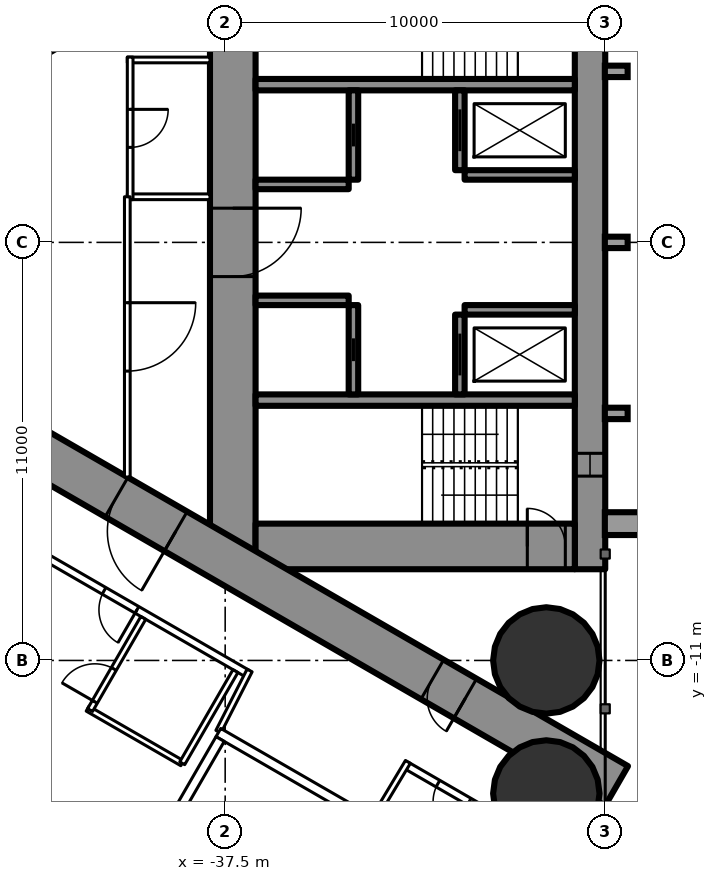
"""IFC4 building model, lengths in metres.
Left out: names, types, materials, properties, quantities, classifications, styles, units other than length and angle.
Written with IfcOpenShell. Run it as: python <this file> out.ifc"""

import sys

from ifc_helpers import new_model, si_unit, direction, frame, frame_2d, origin, origin_2d, place, context, subcontext, project, spatial, rectangle, hollow_circle, extrude, element, fill, save


model = new_model("IFC4")
c1 = context("Model", 3, precision=1e-05, world=origin(), true_north=direction((0.0, 1.0)))
c2 = subcontext(c1, "Body", "Model", "MODEL_VIEW")
j1 = project(units=[si_unit("LENGTHUNIT", "METRE"), si_unit("PLANEANGLEUNIT", "RADIAN")], contexts=[c1])
p1 = place(None, origin())
s1 = spatial("IfcSite", under=j1, at=p1, CompositionType="ELEMENT")
p2 = place(p1, origin())
s2 = spatial("IfcBuilding", under=s1, at=p2, CompositionType="ELEMENT")
p3 = place(p2, frame((0.0, 0.0, 39.0)))
s3 = spatial("IfcBuildingStorey", under=s2, at=p3, CompositionType="ELEMENT", Elevation=39.0)
for number, where, z_axis, x_axis in (
    (1, (-29.05, -11.0, 0.0), (0.0, 0.0, 1.0), (1.0, 0.0, 0.0)),
    (2, (-29.05, -14.5, 0.0), (0.0, 0.0, 1.0), (1.0, 0.0, 0.0)),
):
    element("IfcColumn", number, at=place(p3, frame(where, z_axis=z_axis, x_axis=x_axis)), inside=s3, PredefinedType="COLUMN", context=c2, shape_type="SweptSolid", body=[
        extrude(hollow_circle(Radius=1.4, WallThickness=0.12, at=origin_2d()), origin(), (0.0, 0.0, 1.0), 3.5),
    ])
p4 = place(p3, frame((-27.9, 8.6, 0.0), z_axis=(0.0, 0.0, 1.0), x_axis=(0.0, -1.0, 0.0)))
e3 = element("IfcWall", 3, at=p4, inside=s3, PredefinedType="SHEAR", context=c2, shape_type="SweptSolid", body=[
    extrude(rectangle(XDim=17.2, YDim=0.8, at=frame_2d((8.6, 0.0))), origin(), (0.0, 0.0, 1.0), 3.5),
])
p5 = place(p4, frame((2.45, 0.0, 0.6)))
e4 = element("IfcOpeningElement", 4, at=p5, cuts=e3, PredefinedType="OPENING", context=c2, shape_type="SweptSolid", body=[
    extrude(rectangle(XDim=0.6, YDim=2.1, at=frame_2d((0.3, 1.05))), frame((0.0, 0.41, 0.0), z_axis=(0.0, -1.0, 0.0), x_axis=(1.0, 0.0, 0.0)), (0.0, 0.0, 1.0), 0.82),
])
p6 = place(p4, frame((14.15, 0.0, 0.6)))
e5 = element("IfcOpeningElement", 5, at=p6, cuts=e3, PredefinedType="OPENING", context=c2, shape_type="SweptSolid", body=[
    extrude(rectangle(XDim=0.6, YDim=2.1, at=frame_2d((0.3, 1.05))), frame((0.0, 0.41, 0.0), z_axis=(0.0, -1.0, 0.0), x_axis=(1.0, 0.0, 0.0)), (0.0, 0.0, 1.0), 0.82),
])
p7 = place(p3, frame((-37.3, 8.6, 0.0), z_axis=(0.0, 0.0, 1.0), x_axis=(0.0, -1.0, 0.0)))
e6 = element("IfcWall", 6, at=p7, inside=s3, PredefinedType="SHEAR", context=c2, shape_type="SweptSolid", body=[
    extrude(rectangle(XDim=17.2, YDim=1.2, at=frame_2d((8.6, 0.0))), origin(), (0.0, 0.0, 1.0), 3.5),
])
p8 = place(p7, frame((7.7, 0.0, 0.0)))
e7 = element("IfcOpeningElement", 7, at=p8, cuts=e6, PredefinedType="OPENING", context=c2, shape_type="SweptSolid", body=[
    extrude(rectangle(XDim=1.8, YDim=2.2, at=frame_2d((0.9, 1.1))), frame((0.0, 0.61, 0.0), z_axis=(0.0, -1.0, 0.0), x_axis=(1.0, 0.0, 0.0)), (0.0, 0.0, 1.0), 1.22),
])
p9 = place(p3, frame((-28.3, -8.0, 0.0), z_axis=(0.0, 0.0, 1.0), x_axis=(-1.0, 0.0, 0.0)))
e8 = element("IfcWall", 8, at=p9, inside=s3, PredefinedType="SHEAR", context=c2, shape_type="SweptSolid", body=[
    extrude(rectangle(XDim=8.4, YDim=1.2, at=frame_2d((4.2, 0.0))), origin(), (0.0, 0.0, 1.0), 3.5),
])
p10 = place(p9, frame((0.25, 0.0, 0.0)))
e9 = element("IfcOpeningElement", 9, at=p10, cuts=e8, PredefinedType="OPENING", context=c2, shape_type="SweptSolid", body=[
    extrude(rectangle(XDim=1.0, YDim=2.2, at=frame_2d((0.5, 1.1))), frame((0.0, 0.61, 0.0), z_axis=(0.0, -1.0, 0.0), x_axis=(1.0, 0.0, 0.0)), (0.0, 0.0, 1.0), 1.22),
])
for number, where, z_axis, x_axis in (
    (10, (-28.3, 4.15, 0.0), (0.0, 0.0, 1.0), (-1.0, 0.0, 0.0)),
    (11, (-28.3, -4.15, 0.0), (0.0, 0.0, 1.0), (-1.0, 0.0, 0.0)),
):
    element("IfcWall", number, at=place(p3, frame(where, z_axis=z_axis, x_axis=x_axis)), inside=s3, PredefinedType="SHEAR", context=c2, shape_type="SweptSolid", body=[
        extrude(rectangle(XDim=8.4, YDim=0.3, at=frame_2d((4.2, 0.0))), origin(), (0.0, 0.0, 1.0), 3.5),
    ])
p11 = place(p3, frame((-31.325, 4.0, 0.0), z_axis=(0.0, 0.0, 1.0), x_axis=(0.0, -1.0, 0.0)))
e12 = element("IfcWall", 12, at=p11, inside=s3, PredefinedType="SHEAR", context=c2, shape_type="SweptSolid", body=[
    extrude(rectangle(XDim=2.1, YDim=0.25, at=frame_2d((1.05, 0.0))), origin(), (0.0, 0.0, 1.0), 3.5),
])
p12 = place(p11, frame((0.5, 0.0, 0.0)))
e13 = element("IfcOpeningElement", 13, at=p12, cuts=e12, PredefinedType="OPENING", context=c2, shape_type="SweptSolid", body=[
    extrude(rectangle(XDim=1.1, YDim=2.2, at=frame_2d((0.55, 1.1))), frame((0.0, 0.135, 0.0), z_axis=(0.0, -1.0, 0.0), x_axis=(1.0, 0.0, 0.0)), (0.0, 0.0, 1.0), 0.27),
])
p13 = place(p3, frame((-34.125, 4.0, 0.0), z_axis=(0.0, 0.0, 1.0), x_axis=(0.0, -1.0, 0.0)))
e14 = element("IfcWall", 14, at=p13, inside=s3, PredefinedType="SHEAR", context=c2, shape_type="SweptSolid", body=[
    extrude(rectangle(XDim=2.35, YDim=0.25, at=frame_2d((1.175, 0.0))), origin(), (0.0, 0.0, 1.0), 3.5),
])
p14 = place(p13, frame((0.875, 0.0, 0.0)))
e15 = element("IfcOpeningElement", 15, at=p14, cuts=e14, PredefinedType="OPENING", context=c2, shape_type="SweptSolid", body=[
    extrude(rectangle(XDim=0.6, YDim=2.0, at=frame_2d((0.3, 1.0))), frame((0.0, 0.135, 0.0), z_axis=(0.0, -1.0, 0.0), x_axis=(1.0, 0.0, 0.0)), (0.0, 0.0, 1.0), 0.27),
])
p15 = place(p3, frame((-28.3, 1.775, 0.0), z_axis=(0.0, 0.0, 1.0), x_axis=(-1.0, 0.0, 0.0)))
e16 = element("IfcWall", 16, at=p15, inside=s3, PredefinedType="SHEAR", context=c2, shape_type="SweptSolid", body=[
    extrude(rectangle(XDim=2.9, YDim=0.25, at=frame_2d((1.45, 0.0))), origin(), (0.0, 0.0, 1.0), 3.5),
])
p16 = place(p3, frame((-34.25, 1.525, 0.0), z_axis=(0.0, 0.0, 1.0), x_axis=(-1.0, 0.0, 0.0)))
e17 = element("IfcWall", 17, at=p16, inside=s3, PredefinedType="SHEAR", context=c2, shape_type="SweptSolid", body=[
    extrude(rectangle(XDim=2.45, YDim=0.25, at=frame_2d((1.225, 0.0))), origin(), (0.0, 0.0, 1.0), 3.5),
])
p17 = place(p3, frame((-31.325, -1.9, 0.0), z_axis=(0.0, 0.0, 1.0), x_axis=(0.0, -1.0, 0.0)))
e18 = element("IfcWall", 18, at=p17, inside=s3, PredefinedType="SHEAR", context=c2, shape_type="SweptSolid", body=[
    extrude(rectangle(XDim=2.1, YDim=0.25, at=frame_2d((1.05, 0.0))), origin(), (0.0, 0.0, 1.0), 3.5),
])
p18 = place(p17, frame((0.5, 0.0, 0.0)))
e19 = element("IfcOpeningElement", 19, at=p18, cuts=e18, PredefinedType="OPENING", context=c2, shape_type="SweptSolid", body=[
    extrude(rectangle(XDim=1.1, YDim=2.2, at=frame_2d((0.55, 1.1))), frame((0.0, 0.135, 0.0), z_axis=(0.0, -1.0, 0.0), x_axis=(1.0, 0.0, 0.0)), (0.0, 0.0, 1.0), 0.27),
])
p19 = place(p3, frame((-34.125, -1.65, 0.0), z_axis=(0.0, 0.0, 1.0), x_axis=(0.0, -1.0, 0.0)))
e20 = element("IfcWall", 20, at=p19, inside=s3, PredefinedType="SHEAR", context=c2, shape_type="SweptSolid", body=[
    extrude(rectangle(XDim=2.35, YDim=0.25, at=frame_2d((1.175, 0.0))), origin(), (0.0, 0.0, 1.0), 3.5),
])
p20 = place(p19, frame((0.875, 0.0, 0.0)))
e21 = element("IfcOpeningElement", 21, at=p20, cuts=e20, PredefinedType="OPENING", context=c2, shape_type="SweptSolid", body=[
    extrude(rectangle(XDim=0.6, YDim=2.0, at=frame_2d((0.3, 1.0))), frame((0.0, 0.135, 0.0), z_axis=(0.0, -1.0, 0.0), x_axis=(1.0, 0.0, 0.0)), (0.0, 0.0, 1.0), 0.27),
])
p21 = place(p3, frame((-28.3, -1.775, 0.0), z_axis=(0.0, 0.0, 1.0), x_axis=(-1.0, 0.0, 0.0)))
e22 = element("IfcWall", 22, at=p21, inside=s3, PredefinedType="SHEAR", context=c2, shape_type="SweptSolid", body=[
    extrude(rectangle(XDim=2.9, YDim=0.25, at=frame_2d((1.45, 0.0))), origin(), (0.0, 0.0, 1.0), 3.5),
])
p22 = place(p3, frame((-34.25, -1.525, 0.0), z_axis=(0.0, 0.0, 1.0), x_axis=(-1.0, 0.0, 0.0)))
e23 = element("IfcWall", 23, at=p22, inside=s3, PredefinedType="SHEAR", context=c2, shape_type="SweptSolid", body=[
    extrude(rectangle(XDim=2.45, YDim=0.25, at=frame_2d((1.225, 0.0))), origin(), (0.0, 0.0, 1.0), 3.5),
])
p23 = place(p3, frame((-27.2, 14.3, 0.0), z_axis=(0.0, 0.0, 1.0), x_axis=(-0.866026593062, -0.499997940104, 0.0)))
e24 = element("IfcWall", 24, at=p23, inside=s3, PredefinedType="SHEAR", context=c2, shape_type="SweptSolid", body=[
    extrude(rectangle(XDim=28.946, YDim=1.2, at=frame_2d((14.473, 0.0))), origin(), (0.0, 0.0, 1.0), 3.5),
])
p24 = place(p23, frame((4.6, 0.0, 0.0)))
e25 = element("IfcOpeningElement", 25, at=p24, cuts=e24, PredefinedType="OPENING", context=c2, shape_type="SweptSolid", body=[
    extrude(rectangle(XDim=1.0, YDim=2.2, at=frame_2d((0.5, 1.1))), frame((0.0, 0.61, 0.0), z_axis=(0.0, -1.0, 0.0), x_axis=(1.0, 0.0, 0.0)), (0.0, 0.0, 1.0), 1.22),
])
p25 = place(p23, frame((13.395, 0.0, 0.0)))
e26 = element("IfcOpeningElement", 26, at=p25, cuts=e24, PredefinedType="OPENING", context=c2, shape_type="SweptSolid", body=[
    extrude(rectangle(XDim=1.8, YDim=2.2, at=frame_2d((0.9, 1.1))), frame((0.0, 0.61, 0.0), z_axis=(0.0, -1.0, 0.0), x_axis=(1.0, 0.0, 0.0)), (0.0, 0.0, 1.0), 1.22),
])
p26 = place(p3, frame((-27.2, -14.3, 0.0), z_axis=(0.0, 0.0, 1.0), x_axis=(-0.866024021859, 0.500002393557, 0.0)))
e27 = element("IfcWall", 27, at=p26, inside=s3, PredefinedType="SHEAR", context=c2, shape_type="SweptSolid", body=[
    extrude(rectangle(XDim=27.907, YDim=1.2, at=frame_2d((13.954, 0.0))), origin(), (0.0, 0.0, 1.0), 3.5),
])
p27 = place(p26, frame((4.6, 0.0, 0.0)))
e28 = element("IfcOpeningElement", 28, at=p27, cuts=e27, PredefinedType="OPENING", context=c2, shape_type="SweptSolid", body=[
    extrude(rectangle(XDim=1.0, YDim=2.2, at=frame_2d((0.5, 1.1))), frame((0.0, 0.61, 0.0), z_axis=(0.0, -1.0, 0.0), x_axis=(1.0, 0.0, 0.0)), (0.0, 0.0, 1.0), 1.22),
])
p28 = place(p26, frame((13.395, 0.0, 0.0)))
e29 = element("IfcOpeningElement", 29, at=p28, cuts=e27, PredefinedType="OPENING", context=c2, shape_type="SweptSolid", body=[
    extrude(rectangle(XDim=1.8, YDim=2.2, at=frame_2d((0.9, 1.1))), frame((0.0, 0.61, 0.0), z_axis=(0.0, -1.0, 0.0), x_axis=(1.0, 0.0, 0.0)), (0.0, 0.0, 1.0), 1.22),
])
p29 = place(p3, frame((-37.7, 10.894, 0.0), z_axis=(0.0, 0.0, 1.0), x_axis=(-0.866027905338, -0.499995667157, 0.0)))
e30 = element("IfcWall", 30, at=p29, inside=s3, PredefinedType="PARTITIONING", context=c2, shape_type="SweptSolid", body=[
    extrude(rectangle(XDim=21.787, YDim=0.2, at=frame_2d((10.894, 0.0))), origin(), (0.0, 0.0, 1.0), 3.25),
])
p30 = place(p29, frame((11.78, 0.0, 0.0)))
e31 = element("IfcOpeningElement", 31, at=p30, cuts=e30, PredefinedType="OPENING", context=c2, shape_type="SweptSolid", body=[
    extrude(rectangle(XDim=0.95, YDim=2.2, at=frame_2d((0.475, 1.1))), frame((0.0, 0.11, 0.0), z_axis=(0.0, -1.0, 0.0), x_axis=(1.0, 0.0, 0.0)), (0.0, 0.0, 1.0), 0.22),
])
p31 = place(p29, frame((2.95, 0.0, 0.0)))
e32 = element("IfcOpeningElement", 32, at=p31, cuts=e30, PredefinedType="OPENING", context=c2, shape_type="SweptSolid", body=[
    extrude(rectangle(XDim=0.95, YDim=2.2, at=frame_2d((0.475, 1.1))), frame((0.0, 0.11, 0.0), z_axis=(0.0, -1.0, 0.0), x_axis=(1.0, 0.0, 0.0)), (0.0, 0.0, 1.0), 0.22),
])
p32 = place(p3, frame((-27.572, -16.741, 0.0), z_axis=(0.0, 0.0, 1.0), x_axis=(-0.866024464444, 0.500001626982, 0.0)))
e33 = element("IfcWall", 33, at=p32, inside=s3, PredefinedType="PARTITIONING", context=c2, shape_type="SweptSolid", body=[
    extrude(rectangle(XDim=5.955, YDim=0.2, at=frame_2d((2.978, 0.0))), origin(), (0.0, 0.0, 1.0), 3.25),
])
p33 = place(p32, frame((4.05, 0.0, 0.0)))
e34 = element("IfcOpeningElement", 34, at=p33, cuts=e33, PredefinedType="OPENING", context=c2, shape_type="SweptSolid", body=[
    extrude(rectangle(XDim=0.95, YDim=2.2, at=frame_2d((0.475, 1.1))), frame((0.0, 0.11, 0.0), z_axis=(0.0, -1.0, 0.0), x_axis=(1.0, 0.0, 0.0)), (0.0, 0.0, 1.0), 0.22),
])
p34 = place(p3, frame((-36.92, -11.344, 0.0), z_axis=(0.0, 0.0, 1.0), x_axis=(-0.866028313256, 0.499994960614, 0.0)))
e35 = element("IfcWall", 35, at=p34, inside=s3, PredefinedType="PARTITIONING", context=c2, shape_type="SweptSolid", body=[
    extrude(rectangle(XDim=22.568, YDim=0.2, at=frame_2d((11.284, 0.0))), origin(), (0.0, 0.0, 1.0), 3.25),
])
p35 = place(p34, frame((21.018, 0.0, 0.0)))
e36 = element("IfcOpeningElement", 36, at=p35, cuts=e35, PredefinedType="OPENING", context=c2, shape_type="SweptSolid", body=[
    extrude(rectangle(XDim=0.95, YDim=2.2, at=frame_2d((0.475, 1.1))), frame((0.0, 0.11, 0.0), z_axis=(0.0, -1.0, 0.0), x_axis=(1.0, 0.0, 0.0)), (0.0, 0.0, 1.0), 0.22),
])
p36 = place(p34, frame((3.35, 0.0, 0.0)))
e37 = element("IfcOpeningElement", 37, at=p36, cuts=e35, PredefinedType="OPENING", context=c2, shape_type="SweptSolid", body=[
    extrude(rectangle(XDim=1.0, YDim=2.2, at=frame_2d((0.5, 1.1))), frame((0.0, 0.11, 0.0), z_axis=(0.0, -1.0, 0.0), x_axis=(1.0, 0.0, 0.0)), (0.0, 0.0, 1.0), 0.22),
])
p37 = place(p3, frame((-36.857, -11.265, 0.0), z_axis=(0.0, 0.0, 1.0), x_axis=(-0.454225294761, -0.890886851176, 0.0)))
e38 = element("IfcWall", 38, at=p37, inside=s3, PredefinedType="PARTITIONING", context=c2, shape_type="SweptSolid", body=[
    extrude(rectangle(XDim=1.807, YDim=0.15, at=frame_2d((0.904, 0.0))), origin(), (0.0, 0.0, 1.0), 3.25),
])
p38 = place(p3, frame((-33.621, -15.218, 0.0), z_axis=(0.0, 0.0, 1.0), x_axis=(0.514336634837, 0.857588377991, 0.0)))
e39 = element("IfcWall", 39, at=p38, inside=s3, PredefinedType="PARTITIONING", context=c2, shape_type="SweptSolid", body=[
    extrude(rectangle(XDim=1.805, YDim=0.15, at=frame_2d((0.903, 0.0))), origin(), (0.0, 0.0, 1.0), 3.25),
])
p39 = place(p3, frame((-38.63, -13.705, 0.0), z_axis=(0.0, 0.0, 1.0), x_axis=(-0.866018712932, 0.500011588718, 0.0)))
e40 = element("IfcWall", 40, at=p39, inside=s3, PredefinedType="PARTITIONING", context=c2, shape_type="SweptSolid", body=[
    extrude(rectangle(XDim=2.875, YDim=0.15, at=frame_2d((1.438, 0.0))), origin(), (0.0, 0.0, 1.0), 3.25),
])
p40 = place(p3, frame((-39.655, -9.88, 0.0), z_axis=(0.0, 0.0, 1.0), x_axis=(-0.500049511043, -0.865996816683, 0.0)))
e41 = element("IfcWall", 41, at=p40, inside=s3, PredefinedType="PARTITIONING", context=c2, shape_type="SweptSolid", body=[
    extrude(rectangle(XDim=2.8, YDim=0.15, at=frame_2d((1.4, 0.0))), origin(), (0.0, 0.0, 1.0), 3.25),
])
p41 = place(p40, frame((1.55, 0.0, 0.0)))
e42 = element("IfcOpeningElement", 42, at=p41, cuts=e41, PredefinedType="OPENING", context=c2, shape_type="SweptSolid", body=[
    extrude(rectangle(XDim=1.0, YDim=2.2, at=frame_2d((0.5, 1.1))), frame((0.0, 0.085, 0.0), z_axis=(0.0, -1.0, 0.0), x_axis=(1.0, 0.0, 0.0)), (0.0, 0.0, 1.0), 0.17),
])
p42 = place(p3, frame((-37.23, -11.281, 0.0), z_axis=(0.0, 0.0, 1.0), x_axis=(-0.500049511043, -0.865996816683, 0.0)))
e43 = element("IfcWall", 43, at=p42, inside=s3, PredefinedType="PARTITIONING", context=c2, shape_type="SweptSolid", body=[
    extrude(rectangle(XDim=2.8, YDim=0.15, at=frame_2d((1.4, 0.0))), origin(), (0.0, 0.0, 1.0), 3.25),
])
for number, where, z_axis, x_axis in (
    (44, (-37.9, 1.2, 0.0), (0.0, 0.0, 1.0), (-1.0, 0.0, 0.0)),
    (45, (-37.9, 4.8, 0.0), (0.0, 0.0, 1.0), (-1.0, 0.0, 0.0)),
):
    element("IfcWall", number, at=place(p3, frame(where, z_axis=z_axis, x_axis=x_axis)), inside=s3, PredefinedType="PARTITIONING", context=c2, shape_type="SweptSolid", body=[
        extrude(rectangle(XDim=2.175, YDim=0.15, at=frame_2d((1.087, 0.0))), origin(), (0.0, 0.0, 1.0), 3.25),
    ])
p43 = place(p3, frame((-40.0, 4.875, 0.0), z_axis=(0.0, 0.0, 1.0), x_axis=(0.0, -1.0, 0.0)))
e46 = element("IfcWall", 46, at=p43, inside=s3, PredefinedType="PARTITIONING", context=c2, shape_type="SweptSolid", body=[
    extrude(rectangle(XDim=3.75, YDim=0.15, at=frame_2d((1.875, 0.0))), origin(), (0.0, 0.0, 1.0), 3.25),
])
p44 = place(p43, frame((1.375, 0.0, 0.0)))
e47 = element("IfcOpeningElement", 47, at=p44, cuts=e46, PredefinedType="OPENING", context=c2, shape_type="SweptSolid", body=[
    extrude(rectangle(XDim=1.0, YDim=2.2, at=frame_2d((0.5, 1.1))), frame((0.0, 0.085, 0.0), z_axis=(0.0, -1.0, 0.0), x_axis=(1.0, 0.0, 0.0)), (0.0, 0.0, 1.0), 0.17),
])
p45 = place(p3, frame((-40.075, 1.2, 0.0), z_axis=(0.0, 0.0, 1.0), x_axis=(0.0, -1.0, 0.0)))
e48 = element("IfcWall", 48, at=p45, inside=s3, PredefinedType="PARTITIONING", context=c2, shape_type="SweptSolid", body=[
    extrude(rectangle(XDim=7.374, YDim=0.15, at=frame_2d((3.687, 0.0))), origin(), (0.0, 0.0, 1.0), 3.25),
])
p46 = place(p45, frame((2.787, 0.0, 0.0)))
e49 = element("IfcOpeningElement", 49, at=p46, cuts=e48, PredefinedType="OPENING", context=c2, shape_type="SweptSolid", body=[
    extrude(rectangle(XDim=1.8, YDim=2.2, at=frame_2d((0.9, 1.1))), frame((0.0, 0.085, 0.0), z_axis=(0.0, -1.0, 0.0), x_axis=(1.0, 0.0, 0.0)), (0.0, 0.0, 1.0), 0.17),
])
p47 = place(p3, frame((-33.696, -15.197, 0.0), z_axis=(0.0, 0.0, 1.0), x_axis=(-0.865976953817, 0.500083908417, 0.0)))
e50 = element("IfcWall", 50, at=p47, inside=s3, PredefinedType="PARTITIONING", context=c2, shape_type="SweptSolid", body=[
    extrude(rectangle(XDim=4.599, YDim=0.25, at=frame_2d((2.3, 0.0))), origin(), (0.0, 0.0, 1.0), 3.25),
])
p48 = place(p3, frame((-37.633, -13.068, 0.0), z_axis=(0.0, 0.0, 1.0), x_axis=(-0.499872130319, -0.866099216793, 0.0)))
e51 = element("IfcWall", 51, at=p48, inside=s3, PredefinedType="PARTITIONING", context=c2, shape_type="SweptSolid", body=[
    extrude(rectangle(XDim=3.2, YDim=0.25, at=frame_2d((1.6, 0.0))), origin(), (0.0, 0.0, 1.0), 3.25),
])
p49 = place(p41, origin())
e52 = element("IfcDoor", 52, at=p49, inside=s3, OperationType="SINGLE_SWING_RIGHT", PredefinedType="DOOR", context=c2, shape_type="SweptSolid", body=[
    extrude(rectangle(XDim=1.0, YDim=2.2, at=frame_2d((0.5, 1.1))), frame((0.0, 0.025, 0.0), z_axis=(0.0, -1.0, 0.0), x_axis=(1.0, 0.0, 0.0)), (0.0, 0.0, 1.0), 0.05),
])
fill(e42, e52)
p50 = place(p36, origin())
e53 = element("IfcDoor", 53, at=p50, inside=s3, OperationType="SINGLE_SWING_LEFT", PredefinedType="DOOR", context=c2, shape_type="SweptSolid", body=[
    extrude(rectangle(XDim=1.0, YDim=2.2, at=frame_2d((0.5, 1.1))), frame((0.0, 0.025, 0.0), z_axis=(0.0, -1.0, 0.0), x_axis=(1.0, 0.0, 0.0)), (0.0, 0.0, 1.0), 0.05),
])
fill(e37, e53)
p51 = place(p33, origin())
e54 = element("IfcDoor", 54, at=p51, inside=s3, OperationType="SINGLE_SWING_LEFT", PredefinedType="DOOR", context=c2, shape_type="SweptSolid", body=[
    extrude(rectangle(XDim=0.95, YDim=2.2, at=frame_2d((0.475, 1.1))), frame((0.0, 0.025, 0.0), z_axis=(0.0, -1.0, 0.0), x_axis=(1.0, 0.0, 0.0)), (0.0, 0.0, 1.0), 0.05),
])
fill(e34, e54)
p52 = place(p44, origin())
e55 = element("IfcDoor", 55, at=p52, inside=s3, OperationType="SINGLE_SWING_LEFT", PredefinedType="DOOR", context=c2, shape_type="SweptSolid", body=[
    extrude(rectangle(XDim=1.0, YDim=2.2, at=frame_2d((0.5, 1.1))), frame((0.0, 0.025, 0.0), z_axis=(0.0, -1.0, 0.0), x_axis=(1.0, 0.0, 0.0)), (0.0, 0.0, 1.0), 0.05),
])
fill(e47, e55)
p53 = place(p46, origin())
e56 = element("IfcDoor", 56, at=p53, inside=s3, OperationType="DOUBLE_DOOR_SINGLE_SWING", PredefinedType="DOOR", context=c2, shape_type="SweptSolid", body=[
    extrude(rectangle(XDim=1.8, YDim=2.2, at=frame_2d((0.9, 1.1))), frame((0.0, 0.025, 0.0), z_axis=(0.0, -1.0, 0.0), x_axis=(1.0, 0.0, 0.0)), (0.0, 0.0, 1.0), 0.05),
])
fill(e49, e56)
p54 = place(p27, origin())
e57 = element("IfcDoor", 57, at=p54, inside=s3, OperationType="SINGLE_SWING_LEFT", PredefinedType="DOOR", context=c2, shape_type="SweptSolid", body=[
    extrude(rectangle(XDim=1.0, YDim=2.2, at=frame_2d((0.5, 1.1))), frame((0.0, 0.025, 0.0), z_axis=(0.0, -1.0, 0.0), x_axis=(1.0, 0.0, 0.0)), (0.0, 0.0, 1.0), 0.05),
])
fill(e28, e57)
p55 = place(p28, origin())
e58 = element("IfcDoor", 58, at=p55, inside=s3, OperationType="DOUBLE_DOOR_SINGLE_SWING", PredefinedType="DOOR", context=c2, shape_type="SweptSolid", body=[
    extrude(rectangle(XDim=1.8, YDim=2.2, at=frame_2d((0.9, 1.1))), frame((0.0, 0.025, 0.0), z_axis=(0.0, -1.0, 0.0), x_axis=(1.0, 0.0, 0.0)), (0.0, 0.0, 1.0), 0.05),
])
fill(e29, e58)
p56 = place(p8, origin())
e59 = element("IfcDoor", 59, at=p56, inside=s3, OperationType="DOUBLE_DOOR_SINGLE_SWING", PredefinedType="DOOR", context=c2, shape_type="SweptSolid", body=[
    extrude(rectangle(XDim=1.8, YDim=2.2, at=frame_2d((0.9, 1.1))), frame((0.0, 0.025, 0.0), z_axis=(0.0, -1.0, 0.0), x_axis=(1.0, 0.0, 0.0)), (0.0, 0.0, 1.0), 0.05),
])
fill(e7, e59)
p57 = place(p10, origin())
e60 = element("IfcDoor", 60, at=p57, inside=s3, OperationType="SINGLE_SWING_RIGHT", PredefinedType="DOOR", context=c2, shape_type="SweptSolid", body=[
    extrude(rectangle(XDim=1.0, YDim=2.2, at=frame_2d((0.5, 1.1))), frame((0.0, 0.025, 0.0), z_axis=(0.0, -1.0, 0.0), x_axis=(1.0, 0.0, 0.0)), (0.0, 0.0, 1.0), 0.05),
])
fill(e9, e60)
p58 = place(p12, origin())
e61 = element("IfcDoor", 61, at=p58, inside=s3, OperationType="SLIDING_TO_LEFT", PredefinedType="USERDEFINED", context=c2, shape_type="SweptSolid", body=[
    extrude(rectangle(XDim=1.1, YDim=2.2, at=frame_2d((0.55, 1.1))), frame((0.0, 0.025, 0.0), z_axis=(0.0, -1.0, 0.0), x_axis=(1.0, 0.0, 0.0)), (0.0, 0.0, 1.0), 0.05),
])
fill(e13, e61)
p59 = place(p18, origin())
e62 = element("IfcDoor", 62, at=p59, inside=s3, OperationType="SLIDING_TO_LEFT", PredefinedType="USERDEFINED", context=c2, shape_type="SweptSolid", body=[
    extrude(rectangle(XDim=1.1, YDim=2.2, at=frame_2d((0.55, 1.1))), frame((0.0, 0.025, 0.0), z_axis=(0.0, -1.0, 0.0), x_axis=(1.0, 0.0, 0.0)), (0.0, 0.0, 1.0), 0.05),
])
fill(e19, e62)
p60 = place(p14, origin())
e63 = element("IfcDoor", 63, at=p60, inside=s3, OperationType="SLIDING_TO_LEFT", PredefinedType="DOOR", context=c2, shape_type="SweptSolid", body=[
    extrude(rectangle(XDim=0.6, YDim=2.0, at=frame_2d((0.3, 1.0))), frame((0.0, 0.025, 0.0), z_axis=(0.0, -1.0, 0.0), x_axis=(1.0, 0.0, 0.0)), (0.0, 0.0, 1.0), 0.05),
])
fill(e15, e63)
p61 = place(p20, origin())
e64 = element("IfcDoor", 64, at=p61, inside=s3, OperationType="SLIDING_TO_LEFT", PredefinedType="DOOR", context=c2, shape_type="SweptSolid", body=[
    extrude(rectangle(XDim=0.6, YDim=2.0, at=frame_2d((0.3, 1.0))), frame((0.0, 0.025, 0.0), z_axis=(0.0, -1.0, 0.0), x_axis=(1.0, 0.0, 0.0)), (0.0, 0.0, 1.0), 0.05),
])
fill(e21, e64)
p62 = place(p6, origin())
e65 = element("IfcWindow", 65, at=p62, inside=s3, PartitioningType="SINGLE_PANEL", PredefinedType="WINDOW", context=c2, shape_type="SweptSolid", body=[
    extrude(rectangle(XDim=0.6, YDim=2.1, at=frame_2d((0.3, 1.05))), frame((0.0, 0.03, 0.0), z_axis=(0.0, -1.0, 0.0), x_axis=(1.0, 0.0, 0.0)), (0.0, 0.0, 1.0), 0.06),
])
fill(e5, e65)
save(model, sys.argv[1])
